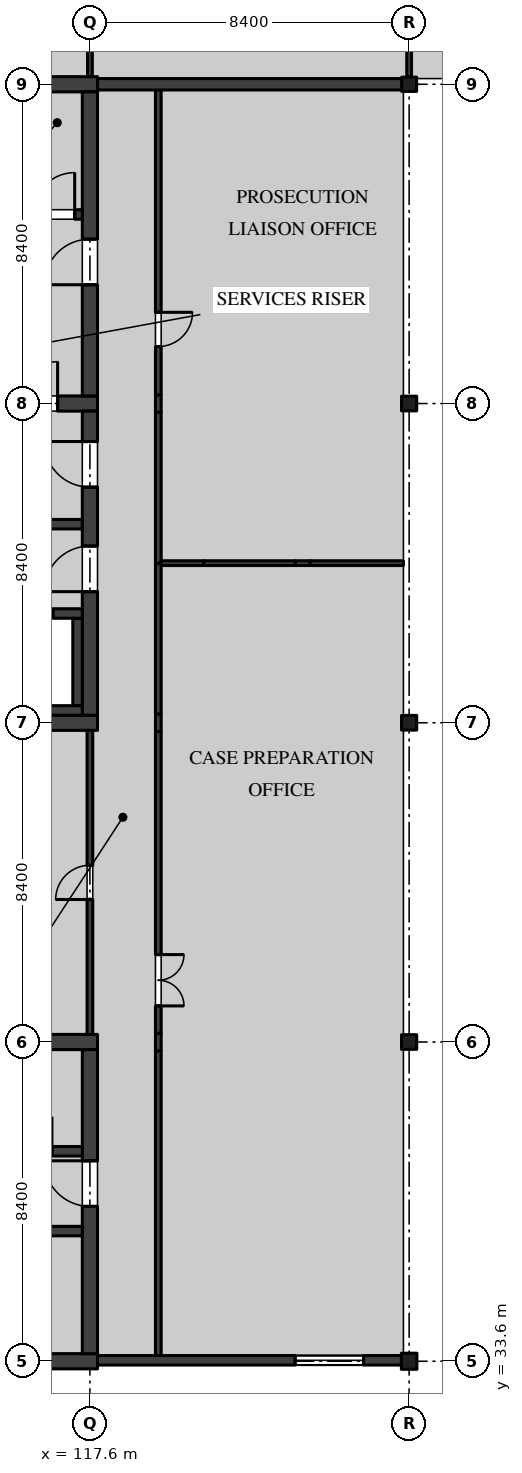
"""IFC4 building model, lengths in metres.
Left out: names, types, materials, properties, quantities, classifications, styles, units other than length and angle.
Written with IfcOpenShell. Run it as: python <this file> out.ifc"""

import sys

from ifc_helpers import new_model, si_unit, direction, frame, frame_2d, origin, origin_2d, place, context, subcontext, project, spatial, rectangle, i_section, extrude, element, fill, save


model = new_model("IFC4")
c1 = context("Model", 3, precision=1e-05, world=origin(), true_north=direction((0.0, 1.0)))
c2 = subcontext(c1, "Body", "Model", "MODEL_VIEW")
j1 = project(units=[si_unit("LENGTHUNIT", "METRE"), si_unit("PLANEANGLEUNIT", "RADIAN")], contexts=[c1])
p1 = place(None, origin())
s1 = spatial("IfcSite", under=j1, at=p1, CompositionType="ELEMENT")
p2 = place(p1, origin())
s2 = spatial("IfcBuilding", under=s1, at=p2, CompositionType="ELEMENT")
p3 = place(p2, frame((0.0, 0.0, 9.9)))
s3 = spatial("IfcBuildingStorey", under=s2, at=p3, CompositionType="ELEMENT", Elevation=9.9)
p4 = place(p3, frame((126.0, 33.6, 0.0), z_axis=(0.0, 0.0, 1.0), x_axis=(1.0, 0.0, 0.0)))
e1 = element("IfcColumn", 1, at=p4, inside=s3, PredefinedType="COLUMN", context=c2, shape_type="SweptSolid", body=[
    extrude(i_section(OverallWidth=0.409, OverallDepth=0.424, WebThickness=0.033, FlangeThickness=0.052, FilletRadius=0.015, at=origin_2d()), origin(), (0.0, 0.0, 1.0), 4.37),
])
for number, where, z_axis, x_axis in (
    (2, (126.0, 42.0, 0.0), (0.0, 0.0, 1.0), (1.0, 0.0, 0.0)),
    (3, (126.0, 50.4, 0.0), (0.0, 0.0, 1.0), (1.0, 0.0, 0.0)),
    (4, (126.0, 58.8, 0.0), (0.0, 0.0, 1.0), (1.0, 0.0, 0.0)),
):
    element("IfcColumn", number, at=place(p3, frame(where, z_axis=z_axis, x_axis=x_axis)), inside=s3, PredefinedType="COLUMN", context=c2, shape_type="SweptSolid", body=[
        extrude(i_section(OverallWidth=0.399, OverallDepth=0.386, WebThickness=0.021, FlangeThickness=0.033, FilletRadius=0.015, at=origin_2d()), origin(), (0.0, 0.0, 1.0), 4.37),
    ])
p5 = place(p3, frame((126.0, 67.2, 0.0), z_axis=(0.0, 0.0, 1.0), x_axis=(1.0, 0.0, 0.0)))
e5 = element("IfcColumn", 5, at=p5, inside=s3, PredefinedType="COLUMN", context=c2, shape_type="SweptSolid", body=[
    extrude(i_section(OverallWidth=0.394, OverallDepth=0.376, WebThickness=0.017, FlangeThickness=0.028, FilletRadius=0.015, at=origin_2d()), origin(), (0.0, 0.0, 1.0), 4.37),
])
p6 = place(p3, frame((109.0, 50.4, 0.0), z_axis=(0.0, 0.0, 1.0), x_axis=(1.0, 0.0, 0.0)))
e6 = element("IfcWall", 6, at=p6, inside=s3, PredefinedType="SHEAR", context=c2, shape_type="SweptSolid", body=[
    extrude(rectangle(XDim=8.8, YDim=0.4, at=frame_2d((4.4, 0.0))), origin(), (0.0, 0.0, 1.0), 4.37),
])
p7 = place(p3, frame((109.0, 58.8, 0.0), z_axis=(0.0, 0.0, 1.0), x_axis=(1.0, 0.0, 0.0)))
e7 = element("IfcWall", 7, at=p7, inside=s3, PredefinedType="SHEAR", context=c2, shape_type="SweptSolid", body=[
    extrude(rectangle(XDim=8.8, YDim=0.4, at=frame_2d((4.4, 0.0))), origin(), (0.0, 0.0, 1.0), 4.37),
])
p8 = place(p7, frame((6.65, 0.0, 0.0)))
e8 = element("IfcOpeningElement", 8, at=p8, cuts=e7, PredefinedType="OPENING", context=c2, shape_type="SweptSolid", body=[
    extrude(rectangle(XDim=1.1, YDim=2.1, at=frame_2d((0.55, 1.05))), frame((0.0, 0.21, 0.0), z_axis=(0.0, -1.0, 0.0), x_axis=(1.0, 0.0, 0.0)), (0.0, 0.0, 1.0), 0.42),
])
p9 = place(p3, frame((117.6, 50.6, 0.0), z_axis=(0.0, 0.0, 1.0), x_axis=(0.0, 1.0, 0.0)))
e9 = element("IfcWall", 9, at=p9, inside=s3, PredefinedType="SHEAR", context=c2, shape_type="SweptSolid", body=[
    extrude(rectangle(XDim=8.0, YDim=0.4, at=frame_2d((4.0, 0.0))), origin(), (0.0, 0.0, 1.0), 4.37),
])
p10 = place(p9, frame((3.25, 0.0, 0.0)))
e10 = element("IfcOpeningElement", 10, at=p10, cuts=e9, PredefinedType="OPENING", context=c2, shape_type="SweptSolid", body=[
    extrude(rectangle(XDim=1.2, YDim=2.1, at=frame_2d((0.6, 1.05))), frame((0.0, 0.21, 0.0), z_axis=(0.0, -1.0, 0.0), x_axis=(1.0, 0.0, 0.0)), (0.0, 0.0, 1.0), 0.42),
])
p11 = place(p9, frame((6.0, 0.0, 0.0)))
e11 = element("IfcOpeningElement", 11, at=p11, cuts=e9, PredefinedType="OPENING", context=c2, shape_type="SweptSolid", body=[
    extrude(rectangle(XDim=1.2, YDim=2.1, at=frame_2d((0.6, 1.05))), frame((0.0, 0.21, 0.0), z_axis=(0.0, -1.0, 0.0), x_axis=(1.0, 0.0, 0.0)), (0.0, 0.0, 1.0), 0.42),
])
p12 = place(p3, frame((114.75, 55.625, 0.0), z_axis=(0.0, 0.0, 1.0), x_axis=(1.0, 0.0, 0.0)))
e12 = element("IfcWall", 12, at=p12, inside=s3, PredefinedType="SOLIDWALL", context=c2, shape_type="SweptSolid", body=[
    extrude(rectangle(XDim=2.65, YDim=0.25, at=frame_2d((1.325, 0.0))), origin(), (0.0, 0.0, 1.0), 4.37),
])
p13 = place(p3, frame((109.0, 67.2, 0.0), z_axis=(0.0, 0.0, 1.0), x_axis=(1.0, 0.0, 0.0)))
e13 = element("IfcWall", 13, at=p13, inside=s3, PredefinedType="SHEAR", context=c2, shape_type="SweptSolid", body=[
    extrude(rectangle(XDim=8.8, YDim=0.4, at=frame_2d((4.4, 0.0))), origin(), (0.0, 0.0, 1.0), 4.37),
])
p14 = place(p3, frame((117.6, 59.0, 0.0), z_axis=(0.0, 0.0, 1.0), x_axis=(0.0, 1.0, 0.0)))
e14 = element("IfcWall", 14, at=p14, inside=s3, PredefinedType="SHEAR", context=c2, shape_type="SweptSolid", body=[
    extrude(rectangle(XDim=8.0, YDim=0.4, at=frame_2d((4.0, 0.0))), origin(), (0.0, 0.0, 1.0), 4.37),
])
p15 = place(p14, frame((2.925, 0.0, 0.0)))
e15 = element("IfcOpeningElement", 15, at=p15, cuts=e14, PredefinedType="OPENING", context=c2, shape_type="SweptSolid", body=[
    extrude(rectangle(XDim=1.2, YDim=2.1, at=frame_2d((0.6, 1.05))), frame((0.0, 0.21, 0.0), z_axis=(0.0, -1.0, 0.0), x_axis=(1.0, 0.0, 0.0)), (0.0, 0.0, 1.0), 0.42),
])
p16 = place(p3, frame((117.4, 63.775, 0.0), z_axis=(0.0, 0.0, 1.0), x_axis=(-1.0, 0.0, 0.0)))
e16 = element("IfcWall", 16, at=p16, inside=s3, PredefinedType="SOLIDWALL", context=c2, shape_type="SweptSolid", body=[
    extrude(rectangle(XDim=8.0, YDim=0.25, at=frame_2d((4.0, 0.0))), origin(), (0.0, 0.0, 1.0), 4.37),
])
p17 = place(p16, frame((0.2, 0.0, 0.0)))
e17 = element("IfcOpeningElement", 17, at=p17, cuts=e16, PredefinedType="OPENING", context=c2, shape_type="SweptSolid", body=[
    extrude(rectangle(XDim=1.1, YDim=2.1, at=frame_2d((0.55, 1.05))), frame((0.0, 0.135, 0.0), z_axis=(0.0, -1.0, 0.0), x_axis=(1.0, 0.0, 0.0)), (0.0, 0.0, 1.0), 0.27),
])
for number, where, z_axis, x_axis in (
    (18, (109.0, 33.6, 0.0), (0.0, 0.0, 1.0), (1.0, 0.0, 0.0)),
    (19, (109.0, 42.0, 0.0), (0.0, 0.0, 1.0), (1.0, 0.0, 0.0)),
):
    element("IfcWall", number, at=place(p3, frame(where, z_axis=z_axis, x_axis=x_axis)), inside=s3, PredefinedType="SHEAR", context=c2, shape_type="SweptSolid", body=[
        extrude(rectangle(XDim=8.8, YDim=0.4, at=frame_2d((4.4, 0.0))), origin(), (0.0, 0.0, 1.0), 4.37),
    ])
p18 = place(p3, frame((117.6, 33.8, 0.0), z_axis=(0.0, 0.0, 1.0), x_axis=(0.0, 1.0, 0.0)))
e20 = element("IfcWall", 20, at=p18, inside=s3, PredefinedType="SHEAR", context=c2, shape_type="SweptSolid", body=[
    extrude(rectangle(XDim=8.0, YDim=0.4, at=frame_2d((4.0, 0.0))), origin(), (0.0, 0.0, 1.0), 4.37),
])
p19 = place(p18, frame((3.875, 0.0, 0.0)))
e21 = element("IfcOpeningElement", 21, at=p19, cuts=e20, PredefinedType="OPENING", context=c2, shape_type="SweptSolid", body=[
    extrude(rectangle(XDim=1.2, YDim=2.1, at=frame_2d((0.6, 1.05))), frame((0.0, 0.21, 0.0), z_axis=(0.0, -1.0, 0.0), x_axis=(1.0, 0.0, 0.0)), (0.0, 0.0, 1.0), 0.42),
])
p20 = place(p3, frame((109.4, 37.025, 0.0), z_axis=(0.0, 0.0, 1.0), x_axis=(1.0, 0.0, 0.0)))
e22 = element("IfcWall", 22, at=p20, inside=s3, PredefinedType="SOLIDWALL", context=c2, shape_type="SweptSolid", body=[
    extrude(rectangle(XDim=8.0, YDim=0.25, at=frame_2d((4.0, 0.0))), origin(), (0.0, 0.0, 1.0), 4.37),
])
p21 = place(p20, frame((0.2, 0.0, 0.0)))
e23 = element("IfcOpeningElement", 23, at=p21, cuts=e22, PredefinedType="OPENING", context=c2, shape_type="SweptSolid", body=[
    extrude(rectangle(XDim=1.1, YDim=2.1, at=frame_2d((0.55, 1.05))), frame((0.0, 0.135, 0.0), z_axis=(0.0, -1.0, 0.0), x_axis=(1.0, 0.0, 0.0)), (0.0, 0.0, 1.0), 0.27),
])
p22 = place(p3, frame((112.05, 39.125, 0.0), z_axis=(0.0, 0.0, 1.0), x_axis=(1.0, 0.0, 0.0)))
e24 = element("IfcWall", 24, at=p22, inside=s3, PredefinedType="SOLIDWALL", context=c2, shape_type="SweptSolid", body=[
    extrude(rectangle(XDim=5.35, YDim=0.25, at=frame_2d((2.675, 0.0))), origin(), (0.0, 0.0, 1.0), 4.37),
])
p23 = place(p22, frame((3.65, 0.0, 0.0)))
e25 = element("IfcOpeningElement", 25, at=p23, cuts=e24, PredefinedType="OPENING", context=c2, shape_type="SweptSolid", body=[
    extrude(rectangle(XDim=0.9, YDim=2.1, at=frame_2d((0.45, 1.05))), frame((0.0, 0.135, 0.0), z_axis=(0.0, -1.0, 0.0), x_axis=(1.0, 0.0, 0.0)), (0.0, 0.0, 1.0), 0.27),
])
p24 = place(p22, frame((0.9, 0.0, 0.0)))
e26 = element("IfcOpeningElement", 26, at=p24, cuts=e24, PredefinedType="OPENING", context=c2, shape_type="SweptSolid", body=[
    extrude(rectangle(XDim=0.8, YDim=2.1, at=frame_2d((0.4, 1.05))), frame((0.0, 0.135, 0.0), z_axis=(0.0, -1.0, 0.0), x_axis=(1.0, 0.0, 0.0)), (0.0, 0.0, 1.0), 0.27),
])
p25 = place(p3, frame((117.275, 50.85, 0.0), z_axis=(0.0, 0.0, 1.0), x_axis=(0.0, 1.0, 0.0)))
e27 = element("IfcWall", 27, at=p25, inside=s3, PredefinedType="SOLIDWALL", context=c2, shape_type="SweptSolid", body=[
    extrude(rectangle(XDim=2.3, YDim=0.25, at=frame_2d((1.15, 0.0))), origin(), (0.0, 0.0, 1.0), 4.37),
])
p26 = place(p3, frame((114.75, 53.275, 0.0), z_axis=(0.0, 0.0, 1.0), x_axis=(1.0, 0.0, 0.0)))
e28 = element("IfcWall", 28, at=p26, inside=s3, PredefinedType="SOLIDWALL", context=c2, shape_type="SweptSolid", body=[
    extrude(rectangle(XDim=2.65, YDim=0.25, at=frame_2d((1.325, 0.0))), origin(), (0.0, 0.0, 1.0), 4.37),
])
p27 = place(p26, frame((0.775, 0.0, 0.0)))
e29 = element("IfcOpeningElement", 29, at=p27, cuts=e28, PredefinedType="OPENING", context=c2, shape_type="SweptSolid", body=[
    extrude(rectangle(XDim=1.1, YDim=2.1, at=frame_2d((0.55, 1.05))), frame((0.0, 0.135, 0.0), z_axis=(0.0, -1.0, 0.0), x_axis=(1.0, 0.0, 0.0)), (0.0, 0.0, 1.0), 0.27),
])
p28 = place(p3, frame((114.75, 50.725, 0.0), z_axis=(0.0, 0.0, 1.0), x_axis=(1.0, 0.0, 0.0)))
e30 = element("IfcWall", 30, at=p28, inside=s3, PredefinedType="SOLIDWALL", context=c2, shape_type="SweptSolid", body=[
    extrude(rectangle(XDim=2.65, YDim=0.25, at=frame_2d((1.325, 0.0))), origin(), (0.0, 0.0, 1.0), 4.37),
])
p29 = place(p3, frame((119.4, 33.75, 0.0), z_axis=(0.0, 0.0, 1.0), x_axis=(0.0, 1.0, 0.0)))
e31 = element("IfcWall", 31, at=p29, inside=s3, PredefinedType="PARTITIONING", context=c2, shape_type="SweptSolid", body=[
    extrude(rectangle(XDim=8.02, YDim=0.15, at=frame_2d((4.01, 0.0))), origin(), (0.0, 0.0, 1.0), 4.37),
])
p30 = place(p3, frame((119.4, 41.77, 0.0), z_axis=(0.0, 0.0, 1.0), x_axis=(0.0, 1.0, 0.0)))
e32 = element("IfcWall", 32, at=p30, inside=s3, PredefinedType="PARTITIONING", context=c2, shape_type="SweptSolid", body=[
    extrude(rectangle(XDim=0.46, YDim=0.15, at=frame_2d((0.23, 0.0))), origin(), (0.0, 0.0, 1.0), 3.746),
])
p31 = place(p3, frame((119.4, 42.23, 0.0), z_axis=(0.0, 0.0, 1.0), x_axis=(0.0, 1.0, 0.0)))
e33 = element("IfcWall", 33, at=p31, inside=s3, PredefinedType="PARTITIONING", context=c2, shape_type="SweptSolid", body=[
    extrude(rectangle(XDim=7.94, YDim=0.15, at=frame_2d((3.97, 0.0))), origin(), (0.0, 0.0, 1.0), 4.37),
])
p32 = place(p31, frame((0.72, 0.0, 0.0)))
e34 = element("IfcOpeningElement", 34, at=p32, cuts=e33, PredefinedType="OPENING", context=c2, shape_type="SweptSolid", body=[
    extrude(rectangle(XDim=1.35, YDim=2.1, at=frame_2d((0.675, 1.05))), frame((0.0, 0.085, 0.0), z_axis=(0.0, -1.0, 0.0), x_axis=(1.0, 0.0, 0.0)), (0.0, 0.0, 1.0), 0.17),
])
p33 = place(p3, frame((119.4, 50.17, 0.0), z_axis=(0.0, 0.0, 1.0), x_axis=(0.0, 1.0, 0.0)))
e35 = element("IfcWall", 35, at=p33, inside=s3, PredefinedType="PARTITIONING", context=c2, shape_type="SweptSolid", body=[
    extrude(rectangle(XDim=0.46, YDim=0.15, at=frame_2d((0.23, 0.0))), origin(), (0.0, 0.0, 1.0), 3.746),
])
p34 = place(p3, frame((119.4, 50.63, 0.0), z_axis=(0.0, 0.0, 1.0), x_axis=(0.0, 1.0, 0.0)))
e36 = element("IfcWall", 36, at=p34, inside=s3, PredefinedType="PARTITIONING", context=c2, shape_type="SweptSolid", body=[
    extrude(rectangle(XDim=3.97, YDim=0.15, at=frame_2d((1.985, 0.0))), origin(), (0.0, 0.0, 1.0), 4.37),
])
p35 = place(p3, frame((119.4, 54.6, 0.0), z_axis=(0.0, 0.0, 1.0), x_axis=(0.0, 1.0, 0.0)))
e37 = element("IfcWall", 37, at=p35, inside=s3, PredefinedType="PARTITIONING", context=c2, shape_type="SweptSolid", body=[
    extrude(rectangle(XDim=3.97, YDim=0.15, at=frame_2d((1.985, 0.0))), origin(), (0.0, 0.0, 1.0), 4.37),
])
p36 = place(p3, frame((119.4, 58.57, 0.0), z_axis=(0.0, 0.0, 1.0), x_axis=(0.0, 1.0, 0.0)))
e38 = element("IfcWall", 38, at=p36, inside=s3, PredefinedType="PARTITIONING", context=c2, shape_type="SweptSolid", body=[
    extrude(rectangle(XDim=0.46, YDim=0.15, at=frame_2d((0.23, 0.0))), origin(), (0.0, 0.0, 1.0), 3.746),
])
p37 = place(p3, frame((119.4, 59.03, 0.0), z_axis=(0.0, 0.0, 1.0), x_axis=(0.0, 1.0, 0.0)))
e39 = element("IfcWall", 39, at=p37, inside=s3, PredefinedType="PARTITIONING", context=c2, shape_type="SweptSolid", body=[
    extrude(rectangle(XDim=8.02, YDim=0.15, at=frame_2d((4.01, 0.0))), origin(), (0.0, 0.0, 1.0), 4.37),
])
p38 = place(p37, frame((1.27, 0.0, 0.0)))
e40 = element("IfcOpeningElement", 40, at=p38, cuts=e39, PredefinedType="OPENING", context=c2, shape_type="SweptSolid", body=[
    extrude(rectangle(XDim=0.9, YDim=2.1, at=frame_2d((0.45, 1.05))), frame((0.0, 0.085, 0.0), z_axis=(0.0, -1.0, 0.0), x_axis=(1.0, 0.0, 0.0)), (0.0, 0.0, 1.0), 0.17),
])
p39 = place(p3, frame((117.6, 42.2, 0.0), z_axis=(0.0, 0.0, 1.0), x_axis=(0.0, 1.0, 0.0)))
e41 = element("IfcWall", 41, at=p39, inside=s3, PredefinedType="PARTITIONING", context=c2, shape_type="SweptSolid", body=[
    extrude(rectangle(XDim=8.0, YDim=0.15, at=frame_2d((4.0, 0.0))), origin(), (0.0, 0.0, 1.0), 3.746),
])
p40 = place(p39, frame((3.55, 0.0, 0.0)))
e42 = element("IfcOpeningElement", 42, at=p40, cuts=e41, PredefinedType="OPENING", context=c2, shape_type="SweptSolid", body=[
    extrude(rectangle(XDim=0.9, YDim=2.1, at=frame_2d((0.45, 1.05))), frame((0.0, 0.085, 0.0), z_axis=(0.0, -1.0, 0.0), x_axis=(1.0, 0.0, 0.0)), (0.0, 0.0, 1.0), 0.17),
])
p41 = place(p3, frame((119.475, 54.6, 0.0), z_axis=(0.0, 0.0, 1.0), x_axis=(1.0, 0.0, 0.0)))
e43 = element("IfcWall", 43, at=p41, inside=s3, PredefinedType="PARTITIONING", context=c2, shape_type="SweptSolid", body=[
    extrude(rectangle(XDim=1.118, YDim=0.125, at=frame_2d((0.559, 0.0))), origin(), (0.0, 0.0, 1.0), 3.895),
])
p42 = place(p3, frame((120.593, 54.6, 0.0), z_axis=(0.0, 0.0, 1.0), x_axis=(1.0, 0.0, 0.0)))
e44 = element("IfcWall", 44, at=p42, inside=s3, PredefinedType="PARTITIONING", context=c2, shape_type="SweptSolid", body=[
    extrude(rectangle(XDim=2.415, YDim=0.125, at=frame_2d((1.208, 0.0))), origin(), (0.0, 0.0, 1.0), 4.37),
])
p43 = place(p3, frame((123.008, 54.6, 0.0), z_axis=(0.0, 0.0, 1.0), x_axis=(1.0, 0.0, 0.0)))
e45 = element("IfcWall", 45, at=p43, inside=s3, PredefinedType="PARTITIONING", context=c2, shape_type="SweptSolid", body=[
    extrude(rectangle(XDim=0.384, YDim=0.125, at=frame_2d((0.192, 0.0))), origin(), (0.0, 0.0, 1.0), 3.895),
])
p44 = place(p3, frame((123.392, 54.6, 0.0), z_axis=(0.0, 0.0, 1.0), x_axis=(1.0, 0.0, 0.0)))
e46 = element("IfcWall", 46, at=p44, inside=s3, PredefinedType="PARTITIONING", context=c2, shape_type="SweptSolid", body=[
    extrude(rectangle(XDim=2.458, YDim=0.125, at=frame_2d((1.229, 0.0))), origin(), (0.0, 0.0, 1.0), 4.37),
])
p45 = place(p3, frame((117.6, 67.4, 0.0), z_axis=(0.0, 0.0, 1.0), x_axis=(0.0, 1.0, 0.0)))
e47 = element("IfcWall", 47, at=p45, inside=s3, PredefinedType="PARTITIONING", context=c2, shape_type="SweptSolid", body=[
    extrude(rectangle(XDim=6.625, YDim=0.125, at=frame_2d((3.312, 0.0))), origin(), (0.0, 0.0, 1.0), 3.746),
])
p46 = place(p3, frame((126.0, 67.388, 0.0), z_axis=(0.0, 0.0, 1.0), x_axis=(0.0, 1.0, 0.0)))
e48 = element("IfcWall", 48, at=p46, inside=s3, PredefinedType="PARTITIONING", context=c2, shape_type="SweptSolid", body=[
    extrude(rectangle(XDim=6.637, YDim=0.125, at=frame_2d((3.318, 0.0))), origin(), (0.0, 0.0, 1.0), 3.746),
])
p47 = place(p3, frame((117.8, 33.625, 0.0), z_axis=(0.0, 0.0, 1.0), x_axis=(1.0, 0.0, 0.0)))
e49 = element("IfcWall", 49, at=p47, inside=s3, PredefinedType="SOLIDWALL", context=c2, shape_type="SweptSolid", body=[
    extrude(rectangle(XDim=8.194, YDim=0.25, at=frame_2d((4.097, 0.0))), origin(), (0.0, 0.0, 1.0), 3.746),
])
p48 = place(p47, frame((5.2, 0.0, 0.9)))
e50 = element("IfcOpeningElement", 50, at=p48, cuts=e49, PredefinedType="OPENING", context=c2, shape_type="SweptSolid", body=[
    extrude(rectangle(XDim=1.8, YDim=2.1, at=frame_2d((0.9, 1.05))), frame((0.0, 0.135, 0.0), z_axis=(0.0, -1.0, 0.0), x_axis=(1.0, 0.0, 0.0)), (0.0, 0.0, 1.0), 0.27),
])
p49 = place(p3, frame((125.999, 67.2, 0.0), z_axis=(0.0, 0.0, 1.0), x_axis=(-1.0, 0.0, 0.0)))
e51 = element("IfcWall", 51, at=p49, inside=s3, PredefinedType="SOLIDWALL", context=c2, shape_type="SweptSolid", body=[
    extrude(rectangle(XDim=8.198, YDim=0.3, at=frame_2d((4.099, 0.0))), origin(), (0.0, 0.0, 1.0), 3.746),
])
p50 = place(p10, origin())
e52 = element("IfcDoor", 52, at=p50, inside=s3, OperationType="SINGLE_SWING_RIGHT", PredefinedType="DOOR", context=c2, shape_type="SweptSolid", body=[
    extrude(rectangle(XDim=1.2, YDim=2.1, at=frame_2d((0.6, 1.05))), frame((0.0, 0.035, 0.0), z_axis=(0.0, -1.0, 0.0), x_axis=(1.0, 0.0, 0.0)), (0.0, 0.0, 1.0), 0.07),
])
fill(e10, e52)
p51 = place(p11, origin())
e53 = element("IfcDoor", 53, at=p51, inside=s3, OperationType="SINGLE_SWING_LEFT", PredefinedType="DOOR", context=c2, shape_type="SweptSolid", body=[
    extrude(rectangle(XDim=1.2, YDim=2.1, at=frame_2d((0.6, 1.05))), frame((0.0, 0.035, 0.0), z_axis=(0.0, -1.0, 0.0), x_axis=(1.0, 0.0, 0.0)), (0.0, 0.0, 1.0), 0.07),
])
fill(e11, e53)
p52 = place(p8, origin())
e54 = element("IfcDoor", 54, at=p52, inside=s3, OperationType="SINGLE_SWING_LEFT", PredefinedType="DOOR", context=c2, shape_type="SweptSolid", body=[
    extrude(rectangle(XDim=1.1, YDim=2.1, at=frame_2d((0.55, 1.05))), frame((0.0, 0.035, 0.0), z_axis=(0.0, -1.0, 0.0), x_axis=(1.0, 0.0, 0.0)), (0.0, 0.0, 1.0), 0.07),
])
fill(e8, e54)
p53 = place(p15, origin())
e55 = element("IfcDoor", 55, at=p53, inside=s3, OperationType="SINGLE_SWING_RIGHT", PredefinedType="DOOR", context=c2, shape_type="SweptSolid", body=[
    extrude(rectangle(XDim=1.2, YDim=2.1, at=frame_2d((0.6, 1.05))), frame((0.0, 0.035, 0.0), z_axis=(0.0, -1.0, 0.0), x_axis=(1.0, 0.0, 0.0)), (0.0, 0.0, 1.0), 0.07),
])
fill(e15, e55)
p54 = place(p17, frame((1.1, 0.0, 0.0), z_axis=(0.0, 0.0, 1.0), x_axis=(-1.0, 0.0, 0.0)))
e56 = element("IfcDoor", 56, at=p54, inside=s3, OperationType="SINGLE_SWING_LEFT", PredefinedType="DOOR", context=c2, shape_type="SweptSolid", body=[
    extrude(rectangle(XDim=1.1, YDim=2.1, at=frame_2d((0.55, 1.05))), frame((0.0, 0.035, 0.0), z_axis=(0.0, -1.0, 0.0), x_axis=(1.0, 0.0, 0.0)), (0.0, 0.0, 1.0), 0.07),
])
fill(e17, e56)
p55 = place(p19, origin())
e57 = element("IfcDoor", 57, at=p55, inside=s3, OperationType="SINGLE_SWING_LEFT", PredefinedType="DOOR", context=c2, shape_type="SweptSolid", body=[
    extrude(rectangle(XDim=1.2, YDim=2.1, at=frame_2d((0.6, 1.05))), frame((0.0, 0.035, 0.0), z_axis=(0.0, -1.0, 0.0), x_axis=(1.0, 0.0, 0.0)), (0.0, 0.0, 1.0), 0.07),
])
fill(e21, e57)
p56 = place(p27, origin())
e58 = element("IfcDoor", 58, at=p56, inside=s3, OperationType="DOUBLE_DOOR_SLIDING", PredefinedType="DOOR", context=c2, shape_type="SweptSolid", body=[
    extrude(rectangle(XDim=1.1, YDim=2.1, at=frame_2d((0.55, 1.05))), frame((0.0, 0.04, 0.0), z_axis=(0.0, -1.0, 0.0), x_axis=(1.0, 0.0, 0.0)), (0.0, 0.0, 1.0), 0.08),
])
fill(e29, e58)
p57 = place(p32, frame((1.35, 0.0, 0.0), z_axis=(0.0, 0.0, 1.0), x_axis=(-1.0, 0.0, 0.0)))
e59 = element("IfcDoor", 59, at=p57, inside=s3, OperationType="DOUBLE_DOOR_SINGLE_SWING", PredefinedType="DOOR", context=c2, shape_type="SweptSolid", body=[
    extrude(rectangle(XDim=1.35, YDim=2.1, at=frame_2d((0.675, 1.05))), frame((0.0, 0.025, 0.0), z_axis=(0.0, -1.0, 0.0), x_axis=(1.0, 0.0, 0.0)), (0.0, 0.0, 1.0), 0.05),
])
fill(e34, e59)
p58 = place(p38, frame((0.9, 0.0, 0.0), z_axis=(0.0, 0.0, 1.0), x_axis=(-1.0, 0.0, 0.0)))
e60 = element("IfcDoor", 60, at=p58, inside=s3, OperationType="SINGLE_SWING_RIGHT", PredefinedType="DOOR", context=c2, shape_type="SweptSolid", body=[
    extrude(rectangle(XDim=0.9, YDim=2.1, at=frame_2d((0.45, 1.05))), frame((0.0, 0.025, 0.0), z_axis=(0.0, -1.0, 0.0), x_axis=(1.0, 0.0, 0.0)), (0.0, 0.0, 1.0), 0.05),
])
fill(e40, e60)
p59 = place(p40, origin())
e61 = element("IfcDoor", 61, at=p59, inside=s3, OperationType="SINGLE_SWING_RIGHT", PredefinedType="DOOR", context=c2, shape_type="SweptSolid", body=[
    extrude(rectangle(XDim=0.9, YDim=2.1, at=frame_2d((0.45, 1.05))), frame((0.0, 0.025, 0.0), z_axis=(0.0, -1.0, 0.0), x_axis=(1.0, 0.0, 0.0)), (0.0, 0.0, 1.0), 0.05),
])
fill(e42, e61)
p60 = place(p48, origin())
e62 = element("IfcWindow", 62, at=p60, inside=s3, PartitioningType="SINGLE_PANEL", PredefinedType="WINDOW", context=c2, shape_type="SweptSolid", body=[
    extrude(rectangle(XDim=1.8, YDim=2.1, at=frame_2d((0.9, 1.05))), frame((0.0, 0.04, 0.0), z_axis=(0.0, -1.0, 0.0), x_axis=(1.0, 0.0, 0.0)), (0.0, 0.0, 1.0), 0.08),
])
fill(e50, e62)
save(model, sys.argv[1])
